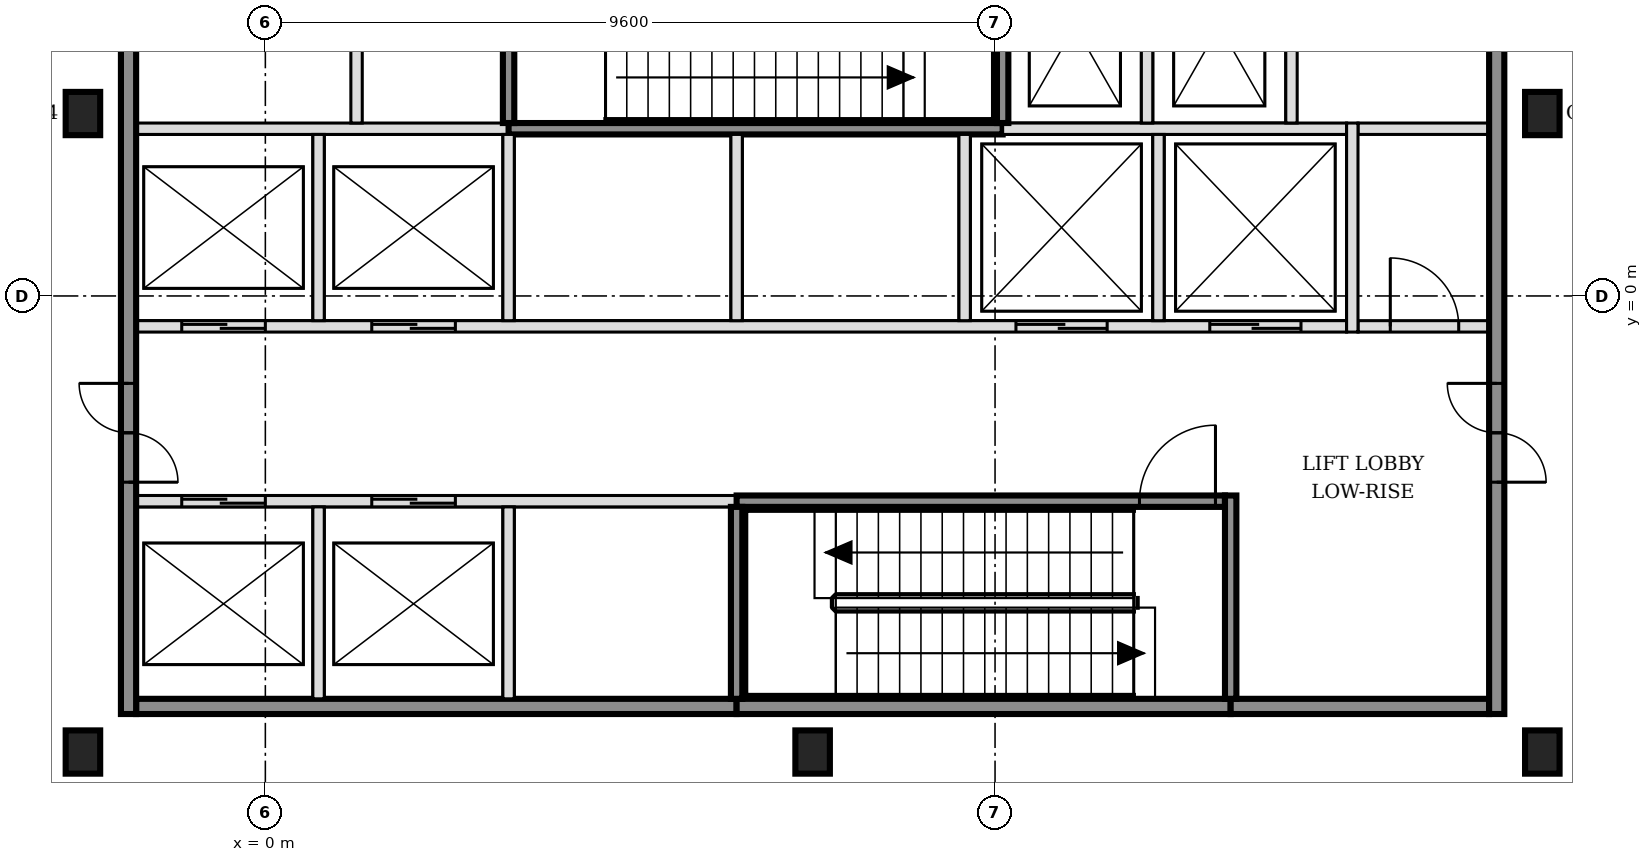
"""IFC4 building model, lengths in metres.
Left out: names, types, materials, properties, quantities, classifications, styles, units other than length and angle.
Written with IfcOpenShell. Run it as: python <this file> out.ifc"""

import sys

from ifc_helpers import new_model, si_unit, direction, frame, frame_2d, origin, origin_2d, place, context, subcontext, project, spatial, rectangle, i_section, extrude, element, fill, save


model = new_model("IFC4")
c1 = context("Model", 3, precision=1e-05, world=origin(), true_north=direction((0.0, 1.0)))
c2 = subcontext(c1, "Body", "Model", "MODEL_VIEW")
j1 = project(units=[si_unit("LENGTHUNIT", "METRE"), si_unit("PLANEANGLEUNIT", "RADIAN")], contexts=[c1])
p1 = place(None, origin())
s1 = spatial("IfcSite", under=j1, at=p1, CompositionType="ELEMENT")
p2 = place(p1, origin())
s2 = spatial("IfcBuilding", under=s1, at=p2, CompositionType="ELEMENT")
p3 = place(p2, frame((0.0, 0.0, 35.4)))
s3 = spatial("IfcBuildingStorey", under=s2, at=p3, CompositionType="ELEMENT", Elevation=35.4)
for number, where, z_axis, x_axis in (
    (1, (-2.4, -6.0, -0.2), (0.0, 0.0, 1.0), (1.0, 0.0, 0.0)),
    (2, (7.2, -6.0, -0.2), (0.0, 0.0, 1.0), (1.0, 0.0, 0.0)),
    (3, (16.8, -6.0, -0.2), (0.0, 0.0, 1.0), (1.0, 0.0, 0.0)),
    (4, (-2.4, 2.4, -0.2), (0.0, 0.0, 1.0), (1.0, 0.0, 0.0)),
    (5, (16.8, 2.4, -0.2), (0.0, 0.0, 1.0), (1.0, 0.0, 0.0)),
):
    element("IfcColumn", number, at=place(p3, frame(where, z_axis=z_axis, x_axis=x_axis)), inside=s3, PredefinedType="COLUMN", context=c2, shape_type="SweptSolid", body=[
        extrude(i_section(OverallWidth=0.454, OverallDepth=0.569, WebThickness=0.078, FlangeThickness=0.125, FilletRadius=0.015, at=origin_2d()), origin(), (0.0, 0.0, 1.0), 4.85),
    ])
p4 = place(p3, frame((-1.7, -5.4, 0.0), z_axis=(0.0, 0.0, 1.0), x_axis=(1.0, 0.0, 0.0)))
e6 = element("IfcWall", 6, at=p4, inside=s3, PredefinedType="SOLIDWALL", context=c2, shape_type="SweptSolid", body=[
    extrude(rectangle(XDim=7.9, YDim=0.2, at=frame_2d((3.95, 0.0))), origin(), (0.0, 0.0, 1.0), 4.65),
])
p5 = place(p3, frame((6.2, -5.4, 0.0), z_axis=(0.0, 0.0, 1.0), x_axis=(1.0, 0.0, 0.0)))
e7 = element("IfcWall", 7, at=p5, inside=s3, PredefinedType="SOLIDWALL", context=c2, shape_type="SweptSolid", body=[
    extrude(rectangle(XDim=6.5, YDim=0.2, at=frame_2d((3.25, 0.0))), origin(), (0.0, 0.0, 1.0), 4.65),
])
p6 = place(p3, frame((12.7, -5.4, 0.0), z_axis=(0.0, 0.0, 1.0), x_axis=(1.0, 0.0, 0.0)))
e8 = element("IfcWall", 8, at=p6, inside=s3, PredefinedType="SOLIDWALL", context=c2, shape_type="SweptSolid", body=[
    extrude(rectangle(XDim=3.4, YDim=0.2, at=frame_2d((1.7, 0.0))), origin(), (0.0, 0.0, 1.0), 4.65),
])
p7 = place(p3, frame((-1.7, -2.7, 0.0), z_axis=(0.0, 0.0, 1.0), x_axis=(1.0, 0.0, 0.0)))
e9 = element("IfcWall", 9, at=p7, inside=s3, PredefinedType="SOLIDWALL", context=c2, shape_type="SweptSolid", body=[
    extrude(rectangle(XDim=7.9, YDim=0.15, at=frame_2d((3.95, 0.0))), origin(), (0.0, 0.0, 1.0), 4.65),
])
p8 = place(p7, frame((0.6, 0.0, 0.0)))
e10 = element("IfcOpeningElement", 10, at=p8, cuts=e9, PredefinedType="OPENING", context=c2, shape_type="SweptSolid", body=[
    extrude(rectangle(XDim=1.1, YDim=2.1, at=frame_2d((0.55, 1.05))), frame((0.0, 0.085, 0.0), z_axis=(0.0, -1.0, 0.0), x_axis=(1.0, 0.0, 0.0)), (0.0, 0.0, 1.0), 0.17),
])
p9 = place(p7, frame((3.1, 0.0, 0.0)))
e11 = element("IfcOpeningElement", 11, at=p9, cuts=e9, PredefinedType="OPENING", context=c2, shape_type="SweptSolid", body=[
    extrude(rectangle(XDim=1.1, YDim=2.1, at=frame_2d((0.55, 1.05))), frame((0.0, 0.085, 0.0), z_axis=(0.0, -1.0, 0.0), x_axis=(1.0, 0.0, 0.0)), (0.0, 0.0, 1.0), 0.17),
])
p10 = place(p3, frame((6.2, -2.7, 0.0), z_axis=(0.0, 0.0, 1.0), x_axis=(1.0, 0.0, 0.0)))
e12 = element("IfcWall", 12, at=p10, inside=s3, PredefinedType="SOLIDWALL", context=c2, shape_type="SweptSolid", body=[
    extrude(rectangle(XDim=6.425, YDim=0.15, at=frame_2d((3.212, 0.0))), origin(), (0.0, 0.0, 1.0), 4.65),
])
p11 = place(p10, frame((5.3, 0.0, 0.0)))
e13 = element("IfcOpeningElement", 13, at=p11, cuts=e12, PredefinedType="OPENING", context=c2, shape_type="SweptSolid", body=[
    extrude(rectangle(XDim=1.0, YDim=2.1, at=frame_2d((0.5, 1.05))), frame((0.0, 0.085, 0.0), z_axis=(0.0, -1.0, 0.0), x_axis=(1.0, 0.0, 0.0)), (0.0, 0.0, 1.0), 0.17),
])
p12 = place(p3, frame((-1.7, -0.4, 0.0), z_axis=(0.0, 0.0, 1.0), x_axis=(1.0, 0.0, 0.0)))
e14 = element("IfcWall", 14, at=p12, inside=s3, PredefinedType="SOLIDWALL", context=c2, shape_type="SweptSolid", body=[
    extrude(rectangle(XDim=15.925, YDim=0.15, at=frame_2d((7.962, 0.0))), origin(), (0.0, 0.0, 1.0), 4.65),
])
p13 = place(p12, frame((0.6, 0.0, 0.0)))
e15 = element("IfcOpeningElement", 15, at=p13, cuts=e14, PredefinedType="OPENING", context=c2, shape_type="SweptSolid", body=[
    extrude(rectangle(XDim=1.1, YDim=2.1, at=frame_2d((0.55, 1.05))), frame((0.0, 0.085, 0.0), z_axis=(0.0, -1.0, 0.0), x_axis=(1.0, 0.0, 0.0)), (0.0, 0.0, 1.0), 0.17),
])
p14 = place(p12, frame((3.1, 0.0, 0.0)))
e16 = element("IfcOpeningElement", 16, at=p14, cuts=e14, PredefinedType="OPENING", context=c2, shape_type="SweptSolid", body=[
    extrude(rectangle(XDim=1.1, YDim=2.1, at=frame_2d((0.55, 1.05))), frame((0.0, 0.085, 0.0), z_axis=(0.0, -1.0, 0.0), x_axis=(1.0, 0.0, 0.0)), (0.0, 0.0, 1.0), 0.17),
])
p15 = place(p12, frame((11.575, 0.0, 0.0)))
e17 = element("IfcOpeningElement", 17, at=p15, cuts=e14, PredefinedType="OPENING", context=c2, shape_type="SweptSolid", body=[
    extrude(rectangle(XDim=1.2, YDim=2.1, at=frame_2d((0.6, 1.05))), frame((0.0, 0.085, 0.0), z_axis=(0.0, -1.0, 0.0), x_axis=(1.0, 0.0, 0.0)), (0.0, 0.0, 1.0), 0.17),
])
p16 = place(p12, frame((14.125, 0.0, 0.0)))
e18 = element("IfcOpeningElement", 18, at=p16, cuts=e14, PredefinedType="OPENING", context=c2, shape_type="SweptSolid", body=[
    extrude(rectangle(XDim=1.2, YDim=2.1, at=frame_2d((0.6, 1.05))), frame((0.0, 0.085, 0.0), z_axis=(0.0, -1.0, 0.0), x_axis=(1.0, 0.0, 0.0)), (0.0, 0.0, 1.0), 0.17),
])
p17 = place(p3, frame((14.375, -0.4, 0.0), z_axis=(0.0, 0.0, 1.0), x_axis=(1.0, 0.0, 0.0)))
e19 = element("IfcWall", 19, at=p17, inside=s3, PredefinedType="PARTITIONING", context=c2, shape_type="SweptSolid", body=[
    extrude(rectangle(XDim=1.725, YDim=0.15, at=frame_2d((0.863, 0.0))), origin(), (0.0, 0.0, 1.0), 4.65),
])
p18 = place(p17, frame((0.425, 0.0, 0.0)))
e20 = element("IfcOpeningElement", 20, at=p18, cuts=e19, PredefinedType="OPENING", context=c2, shape_type="SweptSolid", body=[
    extrude(rectangle(XDim=0.9, YDim=2.1, at=frame_2d((0.45, 1.05))), frame((0.0, 0.085, 0.0), z_axis=(0.0, -1.0, 0.0), x_axis=(1.0, 0.0, 0.0)), (0.0, 0.0, 1.0), 0.17),
])
p19 = place(p3, frame((-1.7, 2.2, 0.0), z_axis=(0.0, 0.0, 1.0), x_axis=(1.0, 0.0, 0.0)))
e21 = element("IfcWall", 21, at=p19, inside=s3, PredefinedType="SOLIDWALL", context=c2, shape_type="SweptSolid", body=[
    extrude(rectangle(XDim=4.9, YDim=0.15, at=frame_2d((2.45, 0.0))), origin(), (0.0, 0.0, 1.0), 4.65),
])
p20 = place(p3, frame((3.2, 2.2, 0.0), z_axis=(0.0, 0.0, 1.0), x_axis=(1.0, 0.0, 0.0)))
e22 = element("IfcWall", 22, at=p20, inside=s3, PredefinedType="SOLIDWALL", context=c2, shape_type="SweptSolid", body=[
    extrude(rectangle(XDim=6.5, YDim=0.15, at=frame_2d((3.25, 0.0))), origin(), (0.0, 0.0, 1.0), 4.65),
])
p21 = place(p3, frame((9.7, 2.2, 0.0), z_axis=(0.0, 0.0, 1.0), x_axis=(1.0, 0.0, 0.0)))
e23 = element("IfcWall", 23, at=p21, inside=s3, PredefinedType="SOLIDWALL", context=c2, shape_type="SweptSolid", body=[
    extrude(rectangle(XDim=4.525, YDim=0.15, at=frame_2d((2.263, 0.0))), origin(), (0.0, 0.0, 1.0), 4.65),
])
p22 = place(p3, frame((14.375, 2.2, 0.0), z_axis=(0.0, 0.0, 1.0), x_axis=(1.0, 0.0, 0.0)))
e24 = element("IfcWall", 24, at=p22, inside=s3, PredefinedType="PARTITIONING", context=c2, shape_type="SweptSolid", body=[
    extrude(rectangle(XDim=1.725, YDim=0.15, at=frame_2d((0.863, 0.0))), origin(), (0.0, 0.0, 1.0), 4.65),
])
p23 = place(p3, frame((-1.8, -5.5, 0.0), z_axis=(0.0, 0.0, 1.0), x_axis=(0.0, 1.0, 0.0)))
e25 = element("IfcWall", 25, at=p23, inside=s3, PredefinedType="SOLIDWALL", context=c2, shape_type="SweptSolid", body=[
    extrude(rectangle(XDim=15.8, YDim=0.2, at=frame_2d((7.9, 0.0))), origin(), (0.0, 0.0, 1.0), 4.65),
])
p24 = place(p23, frame((3.05, 0.0, 0.0)))
e26 = element("IfcOpeningElement", 26, at=p24, cuts=e25, PredefinedType="OPENING", context=c2, shape_type="SweptSolid", body=[
    extrude(rectangle(XDim=1.3, YDim=2.1, at=frame_2d((0.65, 1.05))), frame((0.0, 0.11, 0.0), z_axis=(0.0, -1.0, 0.0), x_axis=(1.0, 0.0, 0.0)), (0.0, 0.0, 1.0), 0.22),
])
p25 = place(p23, frame((11.45, 0.0, 0.0)))
e27 = element("IfcOpeningElement", 27, at=p25, cuts=e25, PredefinedType="OPENING", context=c2, shape_type="SweptSolid", body=[
    extrude(rectangle(XDim=1.3, YDim=2.1, at=frame_2d((0.65, 1.05))), frame((0.0, 0.11, 0.0), z_axis=(0.0, -1.0, 0.0), x_axis=(1.0, 0.0, 0.0)), (0.0, 0.0, 1.0), 0.22),
])
p26 = place(p3, frame((0.7, -5.3, 0.0), z_axis=(0.0, 0.0, 1.0), x_axis=(0.0, 1.0, 0.0)))
e28 = element("IfcWall", 28, at=p26, inside=s3, PredefinedType="SOLIDWALL", context=c2, shape_type="SweptSolid", body=[
    extrude(rectangle(XDim=2.525, YDim=0.15, at=frame_2d((1.263, 0.0))), origin(), (0.0, 0.0, 1.0), 4.65),
])
p27 = place(p3, frame((0.7, -0.325, 0.0), z_axis=(0.0, 0.0, 1.0), x_axis=(0.0, 1.0, 0.0)))
e29 = element("IfcWall", 29, at=p27, inside=s3, PredefinedType="SOLIDWALL", context=c2, shape_type="SweptSolid", body=[
    extrude(rectangle(XDim=2.45, YDim=0.15, at=frame_2d((1.225, 0.0))), origin(), (0.0, 0.0, 1.0), 4.65),
])
p28 = place(p3, frame((1.2, 2.275, 0.0), z_axis=(0.0, 0.0, 1.0), x_axis=(0.0, 1.0, 0.0)))
e30 = element("IfcWall", 30, at=p28, inside=s3, PredefinedType="PARTITIONING", context=c2, shape_type="SweptSolid", body=[
    extrude(rectangle(XDim=2.55, YDim=0.15, at=frame_2d((1.275, 0.0))), origin(), (0.0, 0.0, 1.0), 4.65),
])
p29 = place(p3, frame((3.2, -5.3, 0.0), z_axis=(0.0, 0.0, 1.0), x_axis=(0.0, 1.0, 0.0)))
e31 = element("IfcWall", 31, at=p29, inside=s3, PredefinedType="SOLIDWALL", context=c2, shape_type="SweptSolid", body=[
    extrude(rectangle(XDim=2.525, YDim=0.15, at=frame_2d((1.263, 0.0))), origin(), (0.0, 0.0, 1.0), 4.65),
])
p30 = place(p3, frame((3.2, -0.325, 0.0), z_axis=(0.0, 0.0, 1.0), x_axis=(0.0, 1.0, 0.0)))
e32 = element("IfcWall", 32, at=p30, inside=s3, PredefinedType="SOLIDWALL", context=c2, shape_type="SweptSolid", body=[
    extrude(rectangle(XDim=2.45, YDim=0.15, at=frame_2d((1.225, 0.0))), origin(), (0.0, 0.0, 1.0), 4.65),
])
p31 = place(p3, frame((3.2, 2.275, 0.0), z_axis=(0.0, 0.0, 1.0), x_axis=(0.0, 1.0, 0.0)))
e33 = element("IfcWall", 33, at=p31, inside=s3, PredefinedType="SOLIDWALL", context=c2, shape_type="SweptSolid", body=[
    extrude(rectangle(XDim=2.7, YDim=0.15, at=frame_2d((1.35, 0.0))), origin(), (0.0, 0.0, 1.0), 4.65),
])
p32 = place(p3, frame((6.2, -5.3, 0.0), z_axis=(0.0, 0.0, 1.0), x_axis=(0.0, 1.0, 0.0)))
e34 = element("IfcWall", 34, at=p32, inside=s3, PredefinedType="SOLIDWALL", context=c2, shape_type="SweptSolid", body=[
    extrude(rectangle(XDim=2.525, YDim=0.15, at=frame_2d((1.263, 0.0))), origin(), (0.0, 0.0, 1.0), 4.65),
])
for number, where, z_axis, x_axis in (
    (35, (6.2, -0.325, 0.0), (0.0, 0.0, 1.0), (0.0, 1.0, 0.0)),
    (36, (9.2, -0.325, 0.0), (0.0, 0.0, 1.0), (0.0, 1.0, 0.0)),
):
    element("IfcWall", number, at=place(p3, frame(where, z_axis=z_axis, x_axis=x_axis)), inside=s3, PredefinedType="SOLIDWALL", context=c2, shape_type="SweptSolid", body=[
        extrude(rectangle(XDim=2.45, YDim=0.15, at=frame_2d((1.225, 0.0))), origin(), (0.0, 0.0, 1.0), 4.65),
    ])
for number, where, z_axis, x_axis in (
    (37, (9.7, 2.275, 0.0), (0.0, 0.0, 1.0), (0.0, 1.0, 0.0)),
    (38, (11.6, 2.275, 0.0), (0.0, 0.0, 1.0), (0.0, 1.0, 0.0)),
):
    element("IfcWall", number, at=place(p3, frame(where, z_axis=z_axis, x_axis=x_axis)), inside=s3, PredefinedType="SOLIDWALL", context=c2, shape_type="SweptSolid", body=[
        extrude(rectangle(XDim=2.55, YDim=0.15, at=frame_2d((1.275, 0.0))), origin(), (0.0, 0.0, 1.0), 4.65),
    ])
p33 = place(p3, frame((11.75, -0.325, 0.0), z_axis=(0.0, 0.0, 1.0), x_axis=(0.0, 1.0, 0.0)))
e39 = element("IfcWall", 39, at=p33, inside=s3, PredefinedType="SOLIDWALL", context=c2, shape_type="SweptSolid", body=[
    extrude(rectangle(XDim=2.45, YDim=0.15, at=frame_2d((1.225, 0.0))), origin(), (0.0, 0.0, 1.0), 4.65),
])
p34 = place(p3, frame((12.7, -5.3, 0.0), z_axis=(0.0, 0.0, 1.0), x_axis=(0.0, 1.0, 0.0)))
e40 = element("IfcWall", 40, at=p34, inside=s3, PredefinedType="SOLIDWALL", context=c2, shape_type="SweptSolid", body=[
    extrude(rectangle(XDim=2.675, YDim=0.15, at=frame_2d((1.337, 0.0))), origin(), (0.0, 0.0, 1.0), 4.65),
])
p35 = place(p3, frame((13.5, 2.275, 0.0), z_axis=(0.0, 0.0, 1.0), x_axis=(0.0, 1.0, 0.0)))
e41 = element("IfcWall", 41, at=p35, inside=s3, PredefinedType="SOLIDWALL", context=c2, shape_type="SweptSolid", body=[
    extrude(rectangle(XDim=2.55, YDim=0.15, at=frame_2d((1.275, 0.0))), origin(), (0.0, 0.0, 1.0), 4.65),
])
p36 = place(p3, frame((14.3, -0.475, 0.0), z_axis=(0.0, 0.0, 1.0), x_axis=(0.0, 1.0, 0.0)))
e42 = element("IfcWall", 42, at=p36, inside=s3, PredefinedType="SOLIDWALL", context=c2, shape_type="SweptSolid", body=[
    extrude(rectangle(XDim=2.75, YDim=0.15, at=frame_2d((1.375, 0.0))), origin(), (0.0, 0.0, 1.0), 4.65),
])
p37 = place(p3, frame((16.2, -5.5, 0.0), z_axis=(0.0, 0.0, 1.0), x_axis=(0.0, 1.0, 0.0)))
e43 = element("IfcWall", 43, at=p37, inside=s3, PredefinedType="SOLIDWALL", context=c2, shape_type="SweptSolid", body=[
    extrude(rectangle(XDim=15.8, YDim=0.2, at=frame_2d((7.9, 0.0))), origin(), (0.0, 0.0, 1.0), 4.65),
])
p38 = place(p37, frame((3.05, 0.0, 0.0)))
e44 = element("IfcOpeningElement", 44, at=p38, cuts=e43, PredefinedType="OPENING", context=c2, shape_type="SweptSolid", body=[
    extrude(rectangle(XDim=1.3, YDim=2.1, at=frame_2d((0.65, 1.05))), frame((0.0, 0.11, 0.0), z_axis=(0.0, -1.0, 0.0), x_axis=(1.0, 0.0, 0.0)), (0.0, 0.0, 1.0), 0.22),
])
p39 = place(p37, frame((11.45, 0.0, 0.0)))
e45 = element("IfcOpeningElement", 45, at=p39, cuts=e43, PredefinedType="OPENING", context=c2, shape_type="SweptSolid", body=[
    extrude(rectangle(XDim=1.3, YDim=2.1, at=frame_2d((0.65, 1.05))), frame((0.0, 0.11, 0.0), z_axis=(0.0, -1.0, 0.0), x_axis=(1.0, 0.0, 0.0)), (0.0, 0.0, 1.0), 0.22),
])
p40 = place(p8, origin())
e46 = element("IfcDoor", 46, at=p40, inside=s3, OperationType="DOUBLE_DOOR_SLIDING", PredefinedType="DOOR", context=c2, shape_type="SweptSolid", body=[
    extrude(rectangle(XDim=1.1, YDim=2.1, at=frame_2d((0.55, 1.05))), frame((0.0, 0.025, 0.0), z_axis=(0.0, -1.0, 0.0), x_axis=(1.0, 0.0, 0.0)), (0.0, 0.0, 1.0), 0.05),
])
fill(e10, e46)
p41 = place(p9, origin())
e47 = element("IfcDoor", 47, at=p41, inside=s3, OperationType="DOUBLE_DOOR_SLIDING", PredefinedType="DOOR", context=c2, shape_type="SweptSolid", body=[
    extrude(rectangle(XDim=1.1, YDim=2.1, at=frame_2d((0.55, 1.05))), frame((0.0, 0.025, 0.0), z_axis=(0.0, -1.0, 0.0), x_axis=(1.0, 0.0, 0.0)), (0.0, 0.0, 1.0), 0.05),
])
fill(e11, e47)
p42 = place(p13, origin())
e48 = element("IfcDoor", 48, at=p42, inside=s3, OperationType="DOUBLE_DOOR_SLIDING", PredefinedType="DOOR", context=c2, shape_type="SweptSolid", body=[
    extrude(rectangle(XDim=1.1, YDim=2.1, at=frame_2d((0.55, 1.05))), frame((0.0, 0.025, 0.0), z_axis=(0.0, -1.0, 0.0), x_axis=(1.0, 0.0, 0.0)), (0.0, 0.0, 1.0), 0.05),
])
fill(e15, e48)
p43 = place(p14, origin())
e49 = element("IfcDoor", 49, at=p43, inside=s3, OperationType="DOUBLE_DOOR_SLIDING", PredefinedType="DOOR", context=c2, shape_type="SweptSolid", body=[
    extrude(rectangle(XDim=1.1, YDim=2.1, at=frame_2d((0.55, 1.05))), frame((0.0, 0.025, 0.0), z_axis=(0.0, -1.0, 0.0), x_axis=(1.0, 0.0, 0.0)), (0.0, 0.0, 1.0), 0.05),
])
fill(e16, e49)
p44 = place(p15, origin())
e50 = element("IfcDoor", 50, at=p44, inside=s3, OperationType="DOUBLE_DOOR_SLIDING", PredefinedType="DOOR", context=c2, shape_type="SweptSolid", body=[
    extrude(rectangle(XDim=1.2, YDim=2.1, at=frame_2d((0.6, 1.05))), frame((0.0, 0.025, 0.0), z_axis=(0.0, -1.0, 0.0), x_axis=(1.0, 0.0, 0.0)), (0.0, 0.0, 1.0), 0.05),
])
fill(e17, e50)
p45 = place(p16, origin())
e51 = element("IfcDoor", 51, at=p45, inside=s3, OperationType="DOUBLE_DOOR_SLIDING", PredefinedType="DOOR", context=c2, shape_type="SweptSolid", body=[
    extrude(rectangle(XDim=1.2, YDim=2.1, at=frame_2d((0.6, 1.05))), frame((0.0, 0.025, 0.0), z_axis=(0.0, -1.0, 0.0), x_axis=(1.0, 0.0, 0.0)), (0.0, 0.0, 1.0), 0.05),
])
fill(e18, e51)
p46 = place(p11, origin())
e52 = element("IfcDoor", 52, at=p46, inside=s3, OperationType="SINGLE_SWING_RIGHT", PredefinedType="DOOR", context=c2, shape_type="SweptSolid", body=[
    extrude(rectangle(XDim=1.0, YDim=2.1, at=frame_2d((0.5, 1.05))), frame((0.0, 0.025, 0.0), z_axis=(0.0, -1.0, 0.0), x_axis=(1.0, 0.0, 0.0)), (0.0, 0.0, 1.0), 0.05),
])
fill(e13, e52)
p47 = place(p24, origin())
e53 = element("IfcDoor", 53, at=p47, inside=s3, OperationType="DOUBLE_DOOR_SINGLE_SWING", PredefinedType="DOOR", context=c2, shape_type="SweptSolid", body=[
    extrude(rectangle(XDim=1.3, YDim=2.1, at=frame_2d((0.65, 1.05))), frame((0.0, 0.025, 0.0), z_axis=(0.0, -1.0, 0.0), x_axis=(1.0, 0.0, 0.0)), (0.0, 0.0, 1.0), 0.05),
])
fill(e26, e53)
p48 = place(p38, origin())
e54 = element("IfcDoor", 54, at=p48, inside=s3, OperationType="DOUBLE_DOOR_SINGLE_SWING", PredefinedType="DOOR", context=c2, shape_type="SweptSolid", body=[
    extrude(rectangle(XDim=1.3, YDim=2.1, at=frame_2d((0.65, 1.05))), frame((0.0, 0.025, 0.0), z_axis=(0.0, -1.0, 0.0), x_axis=(1.0, 0.0, 0.0)), (0.0, 0.0, 1.0), 0.05),
])
fill(e44, e54)
p49 = place(p18, origin())
e55 = element("IfcDoor", 55, at=p49, inside=s3, OperationType="SINGLE_SWING_LEFT", PredefinedType="DOOR", context=c2, shape_type="SweptSolid", body=[
    extrude(rectangle(XDim=0.9, YDim=2.1, at=frame_2d((0.45, 1.05))), frame((0.0, 0.025, 0.0), z_axis=(0.0, -1.0, 0.0), x_axis=(1.0, 0.0, 0.0)), (0.0, 0.0, 1.0), 0.05),
])
fill(e20, e55)
save(model, sys.argv[1])
